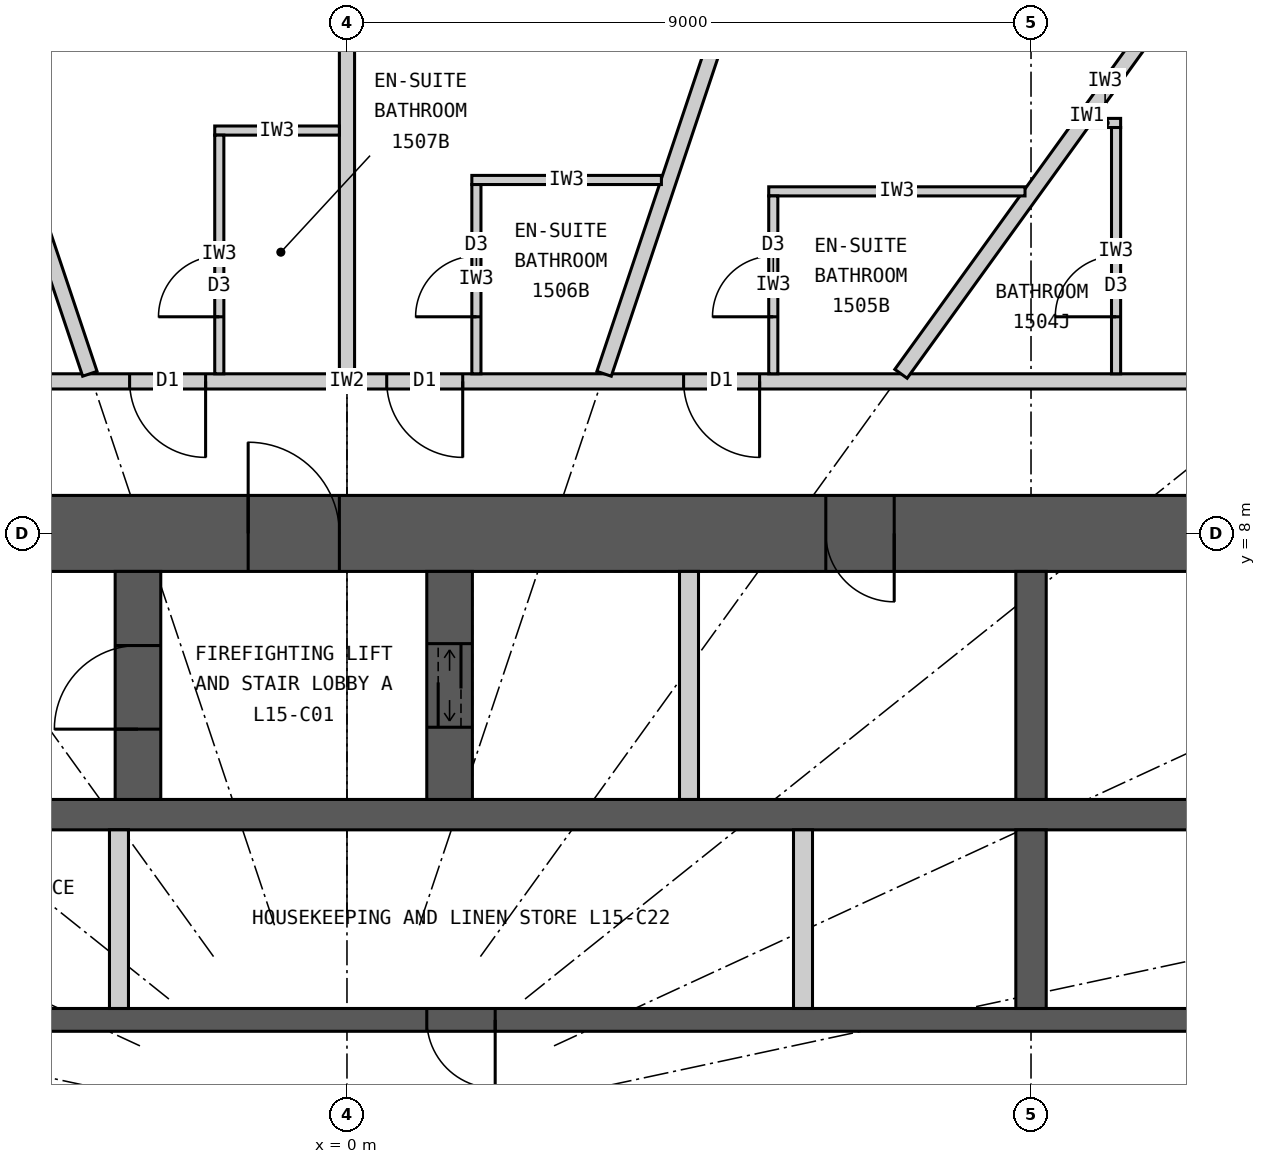
"""IFC4 building model, lengths in metres.
Left out: names, types, materials, properties, quantities, classifications, styles, units other than length and angle.
Written with IfcOpenShell. Run it as: python <this file> out.ifc"""

import sys

from ifc_helpers import new_model, si_unit, direction, frame, frame_2d, origin, place, context, subcontext, project, spatial, rectangle, extrude, element, fill, save


model = new_model("IFC4")
c1 = context("Model", 3, precision=1e-05, world=origin(), true_north=direction((0.0, 1.0)))
c2 = subcontext(c1, "Body", "Model", "MODEL_VIEW")
j1 = project(units=[si_unit("LENGTHUNIT", "METRE"), si_unit("PLANEANGLEUNIT", "RADIAN")], contexts=[c1])
p1 = place(None, origin())
s1 = spatial("IfcSite", under=j1, at=p1, CompositionType="ELEMENT")
p2 = place(p1, origin())
s2 = spatial("IfcBuilding", under=s1, at=p2, CompositionType="ELEMENT")
p3 = place(p2, frame((0.0, 0.0, 63.9)))
s3 = spatial("IfcBuildingStorey", under=s2, at=p3, CompositionType="ELEMENT", Elevation=63.9)
p4 = place(p3, frame((-12.5, 8.0, 0.0), z_axis=(0.0, 0.0, 1.0), x_axis=(1.0, 0.0, 0.0)))
e1 = element("IfcWall", 1, at=p4, inside=s3, PredefinedType="SHEAR", context=c2, shape_type="SweptSolid", body=[
    extrude(rectangle(XDim=25.0, YDim=1.0, at=frame_2d((12.5, 0.0))), origin(), (0.0, 0.0, 1.0), 3.3),
])
p5 = place(p4, frame((11.2, 0.0, 0.0)))
e2 = element("IfcOpeningElement", 2, at=p5, cuts=e1, PredefinedType="OPENING", context=c2, shape_type="SweptSolid", body=[
    extrude(rectangle(XDim=1.2, YDim=2.2, at=frame_2d((0.6, 1.1))), frame((0.0, 0.51, 0.0), z_axis=(0.0, -1.0, 0.0), x_axis=(1.0, 0.0, 0.0)), (0.0, 0.0, 1.0), 1.02),
])
p6 = place(p4, frame((18.8, 0.0, 0.0)))
e3 = element("IfcOpeningElement", 3, at=p6, cuts=e1, PredefinedType="OPENING", context=c2, shape_type="SweptSolid", body=[
    extrude(rectangle(XDim=0.9, YDim=2.2, at=frame_2d((0.45, 1.1))), frame((0.0, 0.51, 0.0), z_axis=(0.0, -1.0, 0.0), x_axis=(1.0, 0.0, 0.0)), (0.0, 0.0, 1.0), 1.02),
])
p7 = place(p3, frame((-11.5, 4.3, 0.0), z_axis=(0.0, 0.0, 1.0), x_axis=(1.0, 0.0, 0.0)))
e4 = element("IfcWall", 4, at=p7, inside=s3, PredefinedType="SHEAR", context=c2, shape_type="SweptSolid", body=[
    extrude(rectangle(XDim=23.0, YDim=0.4, at=frame_2d((11.5, 0.0))), origin(), (0.0, 0.0, 1.0), 3.3),
])
p8 = place(p3, frame((-11.5, 1.6, 0.0), z_axis=(0.0, 0.0, 1.0), x_axis=(1.0, 0.0, 0.0)))
e5 = element("IfcWall", 5, at=p8, inside=s3, PredefinedType="SHEAR", context=c2, shape_type="SweptSolid", body=[
    extrude(rectangle(XDim=23.0, YDim=0.3, at=frame_2d((11.5, 0.0))), origin(), (0.0, 0.0, 1.0), 3.3),
])
p9 = place(p8, frame((0.45, 0.0, 0.0)))
e6 = element("IfcOpeningElement", 6, at=p9, cuts=e5, PredefinedType="OPENING", context=c2, shape_type="SweptSolid", body=[
    extrude(rectangle(XDim=1.1, YDim=2.2, at=frame_2d((0.55, 1.1))), frame((0.0, 0.16, 0.0), z_axis=(0.0, -1.0, 0.0), x_axis=(1.0, 0.0, 0.0)), (0.0, 0.0, 1.0), 0.32),
])
p10 = place(p8, frame((3.45, 0.0, 0.0)))
e7 = element("IfcOpeningElement", 7, at=p10, cuts=e5, PredefinedType="OPENING", context=c2, shape_type="SweptSolid", body=[
    extrude(rectangle(XDim=1.1, YDim=2.2, at=frame_2d((0.55, 1.1))), frame((0.0, 0.16, 0.0), z_axis=(0.0, -1.0, 0.0), x_axis=(1.0, 0.0, 0.0)), (0.0, 0.0, 1.0), 0.32),
])
p11 = place(p8, frame((6.55, 0.0, 0.0)))
e8 = element("IfcOpeningElement", 8, at=p11, cuts=e5, PredefinedType="OPENING", context=c2, shape_type="SweptSolid", body=[
    extrude(rectangle(XDim=0.9, YDim=2.2, at=frame_2d((0.45, 1.1))), frame((0.0, 0.16, 0.0), z_axis=(0.0, -1.0, 0.0), x_axis=(1.0, 0.0, 0.0)), (0.0, 0.0, 1.0), 0.32),
])
p12 = place(p8, frame((12.55, 0.0, 0.0)))
e9 = element("IfcOpeningElement", 9, at=p12, cuts=e5, PredefinedType="OPENING", context=c2, shape_type="SweptSolid", body=[
    extrude(rectangle(XDim=0.9, YDim=2.2, at=frame_2d((0.45, 1.1))), frame((0.0, 0.16, 0.0), z_axis=(0.0, -1.0, 0.0), x_axis=(1.0, 0.0, 0.0)), (0.0, 0.0, 1.0), 0.32),
])
p13 = place(p3, frame((9.0, 4.5, 0.0), z_axis=(0.0, 0.0, 1.0), x_axis=(0.0, 1.0, 0.0)))
e10 = element("IfcWall", 10, at=p13, inside=s3, PredefinedType="SHEAR", context=c2, shape_type="SweptSolid", body=[
    extrude(rectangle(XDim=3.0, YDim=0.4, at=frame_2d((1.5, 0.0))), origin(), (0.0, 0.0, 1.0), 3.3),
])
p14 = place(p3, frame((9.0, 1.75, 0.0), z_axis=(0.0, 0.0, 1.0), x_axis=(0.0, 1.0, 0.0)))
e11 = element("IfcWall", 11, at=p14, inside=s3, PredefinedType="SHEAR", context=c2, shape_type="SweptSolid", body=[
    extrude(rectangle(XDim=2.35, YDim=0.4, at=frame_2d((1.175, 0.0))), origin(), (0.0, 0.0, 1.0), 3.3),
])
p15 = place(p3, frame((-2.75, 4.5, 0.0), z_axis=(0.0, 0.0, 1.0), x_axis=(0.0, 1.0, 0.0)))
e12 = element("IfcWall", 12, at=p15, inside=s3, PredefinedType="SHEAR", context=c2, shape_type="SweptSolid", body=[
    extrude(rectangle(XDim=3.0, YDim=0.6, at=frame_2d((1.5, 0.0))), origin(), (0.0, 0.0, 1.0), 3.3),
])
p16 = place(p15, frame((0.925, 0.0, 0.0)))
e13 = element("IfcOpeningElement", 13, at=p16, cuts=e12, PredefinedType="OPENING", context=c2, shape_type="SweptSolid", body=[
    extrude(rectangle(XDim=1.1, YDim=2.2, at=frame_2d((0.55, 1.1))), frame((0.0, 0.31, 0.0), z_axis=(0.0, -1.0, 0.0), x_axis=(1.0, 0.0, 0.0)), (0.0, 0.0, 1.0), 0.62),
])
p17 = place(p3, frame((1.35, 4.5, 0.0), z_axis=(0.0, 0.0, 1.0), x_axis=(0.0, 1.0, 0.0)))
e14 = element("IfcWall", 14, at=p17, inside=s3, PredefinedType="SHEAR", context=c2, shape_type="SweptSolid", body=[
    extrude(rectangle(XDim=3.0, YDim=0.6, at=frame_2d((1.5, 0.0))), origin(), (0.0, 0.0, 1.0), 3.3),
])
p18 = place(p17, frame((0.95, 0.0, 0.0)))
e15 = element("IfcOpeningElement", 15, at=p18, cuts=e14, PredefinedType="OPENING", context=c2, shape_type="SweptSolid", body=[
    extrude(rectangle(XDim=1.1, YDim=2.2, at=frame_2d((0.55, 1.1))), frame((0.0, 0.31, 0.0), z_axis=(0.0, -1.0, 0.0), x_axis=(1.0, 0.0, 0.0)), (0.0, 0.0, 1.0), 0.62),
])
p19 = place(p3, frame((4.5, 4.5, 0.0), z_axis=(0.0, 0.0, 1.0), x_axis=(0.0, 1.0, 0.0)))
e16 = element("IfcWall", 16, at=p19, inside=s3, PredefinedType="PARTITIONING", context=c2, shape_type="SweptSolid", body=[
    extrude(rectangle(XDim=3.0, YDim=0.25, at=frame_2d((1.5, 0.0))), origin(), (0.0, 0.0, 1.0), 3.3),
])
for number, where, z_axis, x_axis in (
    (17, (-3.0, 1.75, 0.0), (0.0, 0.0, 1.0), (0.0, 1.0, 0.0)),
    (18, (6.0, 1.75, 0.0), (0.0, 0.0, 1.0), (0.0, 1.0, 0.0)),
):
    element("IfcWall", number, at=place(p3, frame(where, z_axis=z_axis, x_axis=x_axis)), inside=s3, PredefinedType="PARTITIONING", context=c2, shape_type="SweptSolid", body=[
        extrude(rectangle(XDim=2.35, YDim=0.25, at=frame_2d((1.175, 0.0))), origin(), (0.0, 0.0, 1.0), 3.3),
    ])
p20 = place(p3, frame((-14.1, 10.0, 0.0), z_axis=(0.0, 0.0, 1.0), x_axis=(1.0, 0.0, 0.0)))
e19 = element("IfcWall", 19, at=p20, inside=s3, PredefinedType="PARTITIONING", context=c2, shape_type="SweptSolid", body=[
    extrude(rectangle(XDim=28.2, YDim=0.2, at=frame_2d((14.1, 0.0))), origin(), (0.0, 0.0, 1.0), 3.12),
])
p21 = place(p20, frame((18.529, 0.0, 0.0)))
e20 = element("IfcOpeningElement", 20, at=p21, cuts=e19, PredefinedType="OPENING", context=c2, shape_type="SweptSolid", body=[
    extrude(rectangle(XDim=1.0, YDim=2.2, at=frame_2d((0.5, 1.1))), frame((0.0, 0.11, 0.0), z_axis=(0.0, -1.0, 0.0), x_axis=(1.0, 0.0, 0.0)), (0.0, 0.0, 1.0), 0.22),
])
p22 = place(p20, frame((14.623, 0.0, 0.0)))
e21 = element("IfcOpeningElement", 21, at=p22, cuts=e19, PredefinedType="OPENING", context=c2, shape_type="SweptSolid", body=[
    extrude(rectangle(XDim=1.0, YDim=2.2, at=frame_2d((0.5, 1.1))), frame((0.0, 0.11, 0.0), z_axis=(0.0, -1.0, 0.0), x_axis=(1.0, 0.0, 0.0)), (0.0, 0.0, 1.0), 0.22),
])
p23 = place(p20, frame((11.24, 0.0, 0.0)))
e22 = element("IfcOpeningElement", 22, at=p23, cuts=e19, PredefinedType="OPENING", context=c2, shape_type="SweptSolid", body=[
    extrude(rectangle(XDim=1.0, YDim=2.2, at=frame_2d((0.5, 1.1))), frame((0.0, 0.11, 0.0), z_axis=(0.0, -1.0, 0.0), x_axis=(1.0, 0.0, 0.0)), (0.0, 0.0, 1.0), 0.22),
])
p24 = place(p20, frame((8.671, 0.0, 0.0)))
e23 = element("IfcOpeningElement", 23, at=p24, cuts=e19, PredefinedType="OPENING", context=c2, shape_type="SweptSolid", body=[
    extrude(rectangle(XDim=1.0, YDim=2.2, at=frame_2d((0.5, 1.1))), frame((0.0, 0.11, 0.0), z_axis=(0.0, -1.0, 0.0), x_axis=(1.0, 0.0, 0.0)), (0.0, 0.0, 1.0), 0.22),
])
p25 = place(p20, frame((2.801, 0.0, 0.0)))
e24 = element("IfcOpeningElement", 24, at=p25, cuts=e19, PredefinedType="OPENING", context=c2, shape_type="SweptSolid", body=[
    extrude(rectangle(XDim=1.0, YDim=2.2, at=frame_2d((0.5, 1.1))), frame((0.0, 0.11, 0.0), z_axis=(0.0, -1.0, 0.0), x_axis=(1.0, 0.0, 0.0)), (0.0, 0.0, 1.0), 0.22),
])
p26 = place(p3, frame((7.289, 10.1, 0.0), z_axis=(0.0, 0.0, 1.0), x_axis=(0.585198353053, 0.810890182197, 0.0)))
e25 = element("IfcWall", 25, at=p26, inside=s3, PredefinedType="PARTITIONING", context=c2, shape_type="SweptSolid", body=[
    extrude(rectangle(XDim=8.36, YDim=0.2, at=frame_2d((4.18, 0.0))), origin(), (0.0, 0.0, 1.0), 2.32),
])
p27 = place(p3, frame((3.383, 10.1, 0.0), z_axis=(0.0, 0.0, 1.0), x_axis=(0.31759592231, 0.948226149256, 0.0)))
e26 = element("IfcWall", 26, at=p27, inside=s3, PredefinedType="PARTITIONING", context=c2, shape_type="SweptSolid", body=[
    extrude(rectangle(XDim=9.098, YDim=0.2, at=frame_2d((4.549, 0.0))), origin(), (0.0, 0.0, 1.0), 2.32),
])
p28 = place(p3, frame((0.0, 10.1, 0.0), z_axis=(0.0, 0.0, 1.0), x_axis=(0.0, 1.0, 0.0)))
e27 = element("IfcWall", 27, at=p28, inside=s3, PredefinedType="PARTITIONING", context=c2, shape_type="SweptSolid", body=[
    extrude(rectangle(XDim=9.25, YDim=0.2, at=frame_2d((4.625, 0.0))), origin(), (0.0, 0.0, 1.0), 2.32),
])
p29 = place(p3, frame((-3.383, 10.1, 0.0), z_axis=(0.0, 0.0, 1.0), x_axis=(-0.31759592231, 0.948226149256, 0.0)))
e28 = element("IfcWall", 28, at=p29, inside=s3, PredefinedType="PARTITIONING", context=c2, shape_type="SweptSolid", body=[
    extrude(rectangle(XDim=9.098, YDim=0.2, at=frame_2d((4.549, 0.0))), origin(), (0.0, 0.0, 1.0), 2.32),
])
p30 = place(p3, frame((9.771, 13.4, 0.0), z_axis=(0.0, 0.0, 1.0), x_axis=(1.0, 0.0, 0.0)))
e29 = element("IfcWall", 29, at=p30, inside=s3, PredefinedType="PARTITIONING", context=c2, shape_type="SweptSolid", body=[
    extrude(rectangle(XDim=0.408, YDim=0.12, at=frame_2d((0.204, 0.0))), origin(), (0.0, 0.0, 1.0), 3.12),
])
p31 = place(p3, frame((10.119, 10.1, 0.0), z_axis=(0.0, 0.0, 1.0), x_axis=(0.0, 1.0, 0.0)))
e30 = element("IfcWall", 30, at=p31, inside=s3, PredefinedType="PARTITIONING", context=c2, shape_type="SweptSolid", body=[
    extrude(rectangle(XDim=3.24, YDim=0.12, at=frame_2d((1.62, 0.0))), origin(), (0.0, 0.0, 1.0), 3.12),
])
p32 = place(p31, frame((0.75, 0.0, 0.0)))
e31 = element("IfcOpeningElement", 31, at=p32, cuts=e30, PredefinedType="OPENING", context=c2, shape_type="SweptSolid", body=[
    extrude(rectangle(XDim=0.8, YDim=2.1, at=frame_2d((0.4, 1.05))), frame((0.0, 0.07, 0.0), z_axis=(0.0, -1.0, 0.0), x_axis=(1.0, 0.0, 0.0)), (0.0, 0.0, 1.0), 0.14),
])
p33 = place(p3, frame((8.921, 12.5, 0.0), z_axis=(0.0, 0.0, 1.0), x_axis=(-1.0, 0.0, 0.0)))
e32 = element("IfcWall", 32, at=p33, inside=s3, PredefinedType="PARTITIONING", context=c2, shape_type="SweptSolid", body=[
    extrude(rectangle(XDim=3.372, YDim=0.12, at=frame_2d((1.686, 0.0))), origin(), (0.0, 0.0, 1.0), 3.12),
])
p34 = place(p3, frame((5.609, 10.1, 0.0), z_axis=(0.0, 0.0, 1.0), x_axis=(0.0, 1.0, 0.0)))
e33 = element("IfcWall", 33, at=p34, inside=s3, PredefinedType="PARTITIONING", context=c2, shape_type="SweptSolid", body=[
    extrude(rectangle(XDim=2.34, YDim=0.12, at=frame_2d((1.17, 0.0))), origin(), (0.0, 0.0, 1.0), 3.12),
])
p35 = place(p34, frame((0.75, 0.0, 0.0)))
e34 = element("IfcOpeningElement", 34, at=p35, cuts=e33, PredefinedType="OPENING", context=c2, shape_type="SweptSolid", body=[
    extrude(rectangle(XDim=0.8, YDim=2.1, at=frame_2d((0.4, 1.05))), frame((0.0, 0.07, 0.0), z_axis=(0.0, -1.0, 0.0), x_axis=(1.0, 0.0, 0.0)), (0.0, 0.0, 1.0), 0.14),
])
p36 = place(p3, frame((4.137, 12.65, 0.0), z_axis=(0.0, 0.0, 1.0), x_axis=(-1.0, 0.0, 0.0)))
e35 = element("IfcWall", 35, at=p36, inside=s3, PredefinedType="PARTITIONING", context=c2, shape_type="SweptSolid", body=[
    extrude(rectangle(XDim=2.494, YDim=0.12, at=frame_2d((1.247, 0.0))), origin(), (0.0, 0.0, 1.0), 3.12),
])
p37 = place(p3, frame((1.703, 10.1, 0.0), z_axis=(0.0, 0.0, 1.0), x_axis=(0.0, 1.0, 0.0)))
e36 = element("IfcWall", 36, at=p37, inside=s3, PredefinedType="PARTITIONING", context=c2, shape_type="SweptSolid", body=[
    extrude(rectangle(XDim=2.49, YDim=0.12, at=frame_2d((1.245, 0.0))), origin(), (0.0, 0.0, 1.0), 3.12),
])
p38 = place(p37, frame((0.75, 0.0, 0.0)))
e37 = element("IfcOpeningElement", 37, at=p38, cuts=e36, PredefinedType="OPENING", context=c2, shape_type="SweptSolid", body=[
    extrude(rectangle(XDim=0.8, YDim=2.1, at=frame_2d((0.4, 1.05))), frame((0.0, 0.07, 0.0), z_axis=(0.0, -1.0, 0.0), x_axis=(1.0, 0.0, 0.0)), (0.0, 0.0, 1.0), 0.14),
])
p39 = place(p3, frame((-0.1, 13.3, 0.0), z_axis=(0.0, 0.0, 1.0), x_axis=(-1.0, 0.0, 0.0)))
e38 = element("IfcWall", 38, at=p39, inside=s3, PredefinedType="PARTITIONING", context=c2, shape_type="SweptSolid", body=[
    extrude(rectangle(XDim=1.64, YDim=0.12, at=frame_2d((0.82, 0.0))), origin(), (0.0, 0.0, 1.0), 3.12),
])
p40 = place(p3, frame((-1.68, 10.1, 0.0), z_axis=(0.0, 0.0, 1.0), x_axis=(0.0, 1.0, 0.0)))
e39 = element("IfcWall", 39, at=p40, inside=s3, PredefinedType="PARTITIONING", context=c2, shape_type="SweptSolid", body=[
    extrude(rectangle(XDim=3.14, YDim=0.12, at=frame_2d((1.57, 0.0))), origin(), (0.0, 0.0, 1.0), 3.12),
])
p41 = place(p40, frame((0.75, 0.0, 0.0)))
e40 = element("IfcOpeningElement", 40, at=p41, cuts=e39, PredefinedType="OPENING", context=c2, shape_type="SweptSolid", body=[
    extrude(rectangle(XDim=0.8, YDim=2.1, at=frame_2d((0.4, 1.05))), frame((0.0, 0.07, 0.0), z_axis=(0.0, -1.0, 0.0), x_axis=(1.0, 0.0, 0.0)), (0.0, 0.0, 1.0), 0.14),
])
p42 = place(p32, origin())
e41 = element("IfcDoor", 41, at=p42, inside=s3, OperationType="SINGLE_SWING_LEFT", PredefinedType="DOOR", context=c2, shape_type="SweptSolid", body=[
    extrude(rectangle(XDim=0.8, YDim=2.1, at=frame_2d((0.4, 1.05))), frame((0.0, 0.025, 0.0), z_axis=(0.0, -1.0, 0.0), x_axis=(1.0, 0.0, 0.0)), (0.0, 0.0, 1.0), 0.05),
])
fill(e31, e41)
p43 = place(p35, origin())
e42 = element("IfcDoor", 42, at=p43, inside=s3, OperationType="SINGLE_SWING_LEFT", PredefinedType="DOOR", context=c2, shape_type="SweptSolid", body=[
    extrude(rectangle(XDim=0.8, YDim=2.1, at=frame_2d((0.4, 1.05))), frame((0.0, 0.025, 0.0), z_axis=(0.0, -1.0, 0.0), x_axis=(1.0, 0.0, 0.0)), (0.0, 0.0, 1.0), 0.05),
])
fill(e34, e42)
p44 = place(p21, origin())
e43 = element("IfcDoor", 43, at=p44, inside=s3, OperationType="SINGLE_SWING_RIGHT", PredefinedType="DOOR", context=c2, shape_type="SweptSolid", body=[
    extrude(rectangle(XDim=1.0, YDim=2.2, at=frame_2d((0.5, 1.1))), frame((0.0, 0.025, 0.0), z_axis=(0.0, -1.0, 0.0), x_axis=(1.0, 0.0, 0.0)), (0.0, 0.0, 1.0), 0.05),
])
fill(e20, e43)
p45 = place(p38, origin())
e44 = element("IfcDoor", 44, at=p45, inside=s3, OperationType="SINGLE_SWING_LEFT", PredefinedType="DOOR", context=c2, shape_type="SweptSolid", body=[
    extrude(rectangle(XDim=0.8, YDim=2.1, at=frame_2d((0.4, 1.05))), frame((0.0, 0.025, 0.0), z_axis=(0.0, -1.0, 0.0), x_axis=(1.0, 0.0, 0.0)), (0.0, 0.0, 1.0), 0.05),
])
fill(e37, e44)
p46 = place(p22, origin())
e45 = element("IfcDoor", 45, at=p46, inside=s3, OperationType="SINGLE_SWING_RIGHT", PredefinedType="DOOR", context=c2, shape_type="SweptSolid", body=[
    extrude(rectangle(XDim=1.0, YDim=2.2, at=frame_2d((0.5, 1.1))), frame((0.0, 0.025, 0.0), z_axis=(0.0, -1.0, 0.0), x_axis=(1.0, 0.0, 0.0)), (0.0, 0.0, 1.0), 0.05),
])
fill(e21, e45)
p47 = place(p41, origin())
e46 = element("IfcDoor", 46, at=p47, inside=s3, OperationType="SINGLE_SWING_LEFT", PredefinedType="DOOR", context=c2, shape_type="SweptSolid", body=[
    extrude(rectangle(XDim=0.8, YDim=2.1, at=frame_2d((0.4, 1.05))), frame((0.0, 0.025, 0.0), z_axis=(0.0, -1.0, 0.0), x_axis=(1.0, 0.0, 0.0)), (0.0, 0.0, 1.0), 0.05),
])
fill(e40, e46)
p48 = place(p23, origin())
e47 = element("IfcDoor", 47, at=p48, inside=s3, OperationType="SINGLE_SWING_RIGHT", PredefinedType="DOOR", context=c2, shape_type="SweptSolid", body=[
    extrude(rectangle(XDim=1.0, YDim=2.2, at=frame_2d((0.5, 1.1))), frame((0.0, 0.025, 0.0), z_axis=(0.0, -1.0, 0.0), x_axis=(1.0, 0.0, 0.0)), (0.0, 0.0, 1.0), 0.05),
])
fill(e22, e47)
p49 = place(p5, origin())
e48 = element("IfcDoor", 48, at=p49, inside=s3, OperationType="SINGLE_SWING_LEFT", PredefinedType="DOOR", context=c2, shape_type="SweptSolid", body=[
    extrude(rectangle(XDim=1.2, YDim=2.2, at=frame_2d((0.6, 1.1))), frame((0.0, 0.025, 0.0), z_axis=(0.0, -1.0, 0.0), x_axis=(1.0, 0.0, 0.0)), (0.0, 0.0, 1.0), 0.05),
])
fill(e2, e48)
p50 = place(p16, origin())
e49 = element("IfcDoor", 49, at=p50, inside=s3, OperationType="SINGLE_SWING_LEFT", PredefinedType="DOOR", context=c2, shape_type="SweptSolid", body=[
    extrude(rectangle(XDim=1.1, YDim=2.2, at=frame_2d((0.55, 1.1))), frame((0.0, 0.025, 0.0), z_axis=(0.0, -1.0, 0.0), x_axis=(1.0, 0.0, 0.0)), (0.0, 0.0, 1.0), 0.05),
])
fill(e13, e49)
p51 = place(p18, origin())
e50 = element("IfcDoor", 50, at=p51, inside=s3, OperationType="DOUBLE_DOOR_SLIDING", PredefinedType="DOOR", context=c2, shape_type="SweptSolid", body=[
    extrude(rectangle(XDim=1.1, YDim=2.2, at=frame_2d((0.55, 1.1))), frame((0.0, 0.025, 0.0), z_axis=(0.0, -1.0, 0.0), x_axis=(1.0, 0.0, 0.0)), (0.0, 0.0, 1.0), 0.05),
])
fill(e15, e50)
p52 = place(p6, origin())
e51 = element("IfcDoor", 51, at=p52, inside=s3, OperationType="SINGLE_SWING_RIGHT", PredefinedType="DOOR", context=c2, shape_type="SweptSolid", body=[
    extrude(rectangle(XDim=0.9, YDim=2.2, at=frame_2d((0.45, 1.1))), frame((0.0, 0.025, 0.0), z_axis=(0.0, -1.0, 0.0), x_axis=(1.0, 0.0, 0.0)), (0.0, 0.0, 1.0), 0.05),
])
fill(e3, e51)
p53 = place(p12, origin())
e52 = element("IfcDoor", 52, at=p53, inside=s3, OperationType="SINGLE_SWING_RIGHT", PredefinedType="DOOR", context=c2, shape_type="SweptSolid", body=[
    extrude(rectangle(XDim=0.9, YDim=2.2, at=frame_2d((0.45, 1.1))), frame((0.0, 0.025, 0.0), z_axis=(0.0, -1.0, 0.0), x_axis=(1.0, 0.0, 0.0)), (0.0, 0.0, 1.0), 0.05),
])
fill(e9, e52)
save(model, sys.argv[1])
